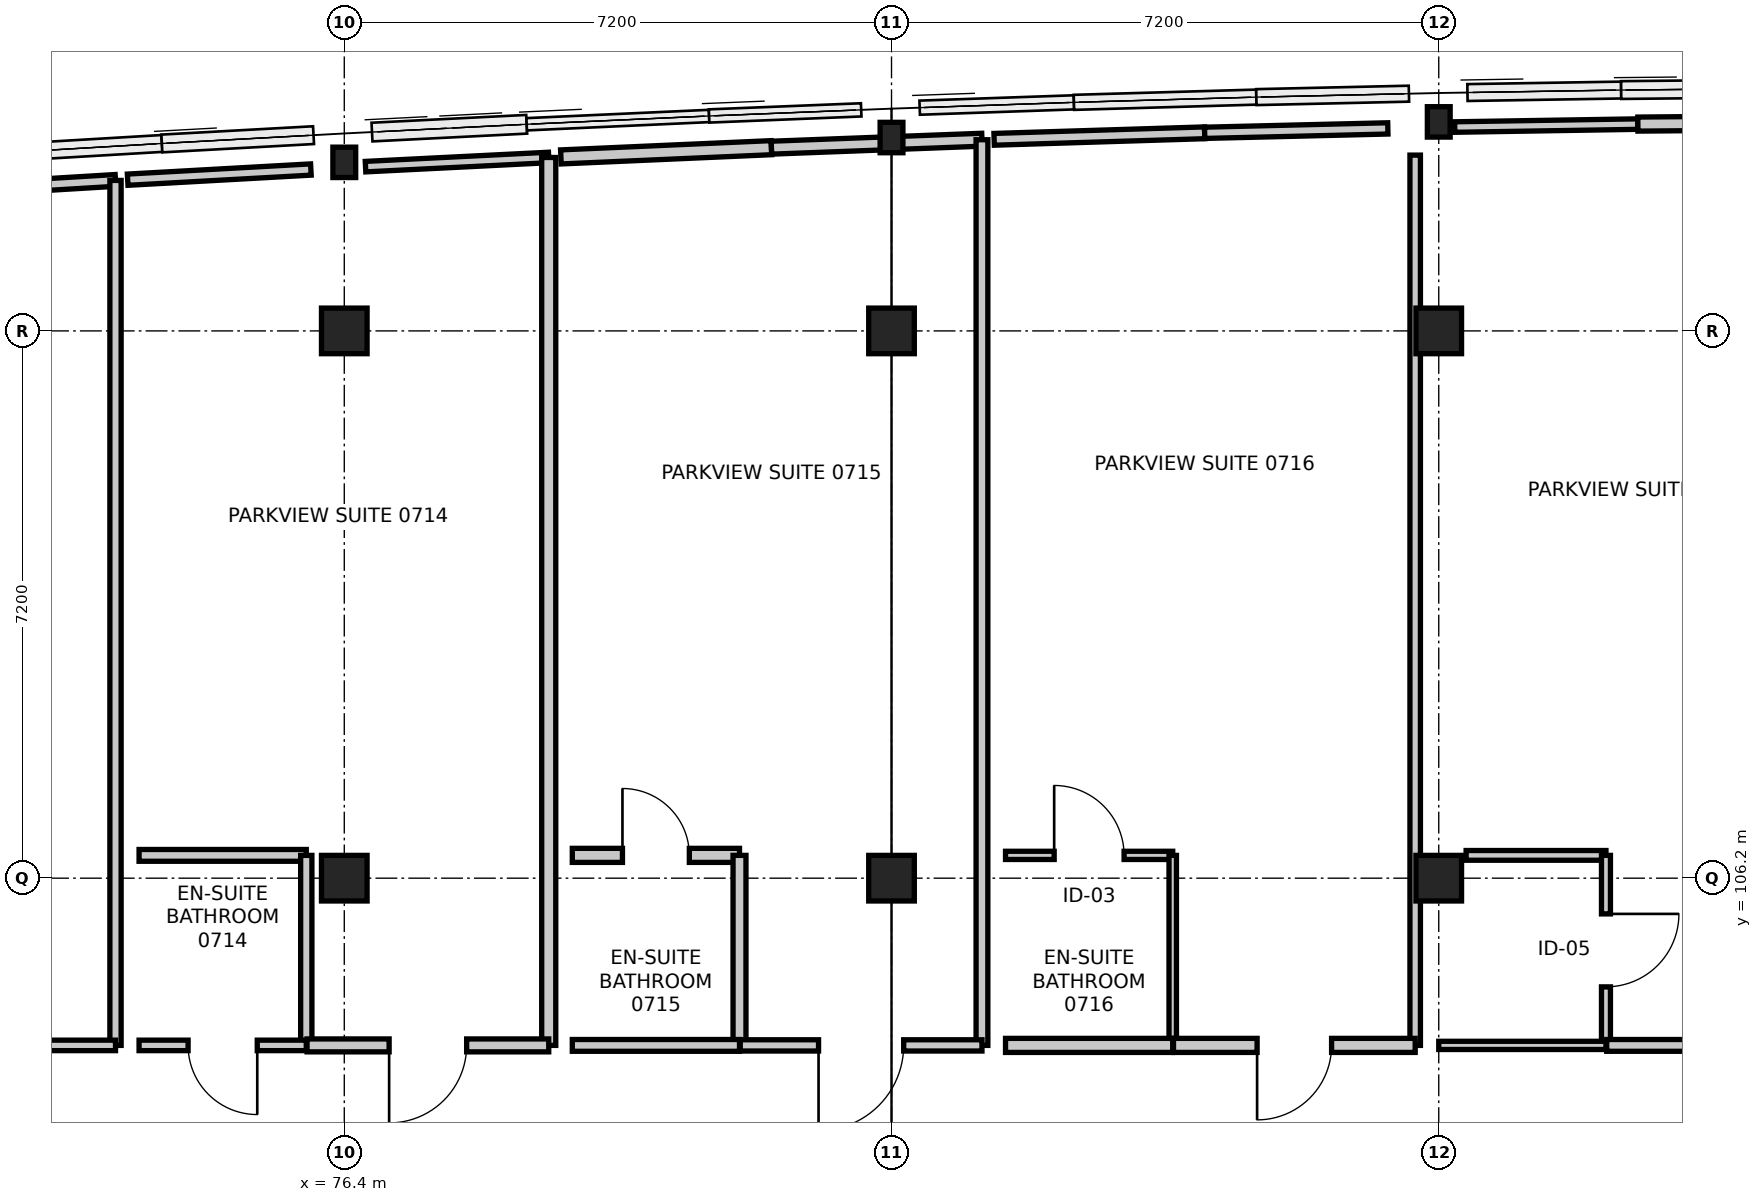
"""IFC4 building model, lengths in metres.
Left out: names, types, materials, properties, quantities, classifications, styles, units other than length and angle.
Written with IfcOpenShell. Run it as: python <this file> out.ifc"""

import sys

from ifc_helpers import new_model, si_unit, direction, frame, frame_2d, origin, origin_2d, place, context, subcontext, project, spatial, rectangle, i_section, extrude, element, fill, save


model = new_model("IFC4")
c1 = context("Model", 3, precision=1e-05, world=origin(), true_north=direction((0.0, 1.0)))
c2 = subcontext(c1, "Body", "Model", "MODEL_VIEW")
j1 = project(units=[si_unit("LENGTHUNIT", "METRE"), si_unit("PLANEANGLEUNIT", "RADIAN")], contexts=[c1])
p1 = place(None, origin())
s1 = spatial("IfcSite", under=j1, at=p1, CompositionType="ELEMENT")
p2 = place(p1, origin())
s2 = spatial("IfcBuilding", under=s1, at=p2, CompositionType="ELEMENT")
p3 = place(p2, frame((0.0, 0.0, 30.0)))
s3 = spatial("IfcBuildingStorey", under=s2, at=p3, CompositionType="ELEMENT", Elevation=30.0)
for number, where, z_axis, x_axis in (
    (1, (76.4, 106.2, 0.0), (0.0, 0.0, 1.0), (1.0, 0.0, 0.0)),
    (2, (76.4, 113.4, 0.0), (0.0, 0.0, 1.0), (1.0, 0.0, 0.0)),
):
    element("IfcColumn", number, at=place(p3, frame(where, z_axis=z_axis, x_axis=x_axis)), inside=s3, PredefinedType="COLUMN", context=c2, shape_type="SweptSolid", body=[
        extrude(rectangle(XDim=0.6, YDim=0.6, at=origin_2d()), origin(), (0.0, 0.0, 1.0), 3.6),
    ])
p4 = place(p3, frame((76.4, 115.618, 0.0), z_axis=(0.0, 0.0, 1.0), x_axis=(1.0, 0.0, 0.0)))
e3 = element("IfcColumn", 3, at=p4, inside=s3, PredefinedType="COLUMN", context=c2, shape_type="SweptSolid", body=[
    extrude(i_section(OverallWidth=0.3, OverallDepth=0.4, WebThickness=0.013, FlangeThickness=0.024, FilletRadius=0.027, at=origin_2d()), origin(), (0.0, 0.0, 1.0), 3.6),
])
for number, where, z_axis, x_axis in (
    (4, (83.6, 106.2, 0.0), (0.0, 0.0, 1.0), (1.0, 0.0, 0.0)),
    (5, (83.6, 113.4, 0.0), (0.0, 0.0, 1.0), (1.0, 0.0, 0.0)),
):
    element("IfcColumn", number, at=place(p3, frame(where, z_axis=z_axis, x_axis=x_axis)), inside=s3, PredefinedType="COLUMN", context=c2, shape_type="SweptSolid", body=[
        extrude(rectangle(XDim=0.6, YDim=0.6, at=origin_2d()), origin(), (0.0, 0.0, 1.0), 3.6),
    ])
p5 = place(p3, frame((83.6, 115.944, 0.0), z_axis=(0.0, 0.0, 1.0), x_axis=(1.0, 0.0, 0.0)))
e6 = element("IfcColumn", 6, at=p5, inside=s3, PredefinedType="COLUMN", context=c2, shape_type="SweptSolid", body=[
    extrude(i_section(OverallWidth=0.3, OverallDepth=0.4, WebThickness=0.013, FlangeThickness=0.024, FilletRadius=0.027, at=origin_2d()), origin(), (0.0, 0.0, 1.0), 3.6),
])
for number, where, z_axis, x_axis in (
    (7, (90.8, 106.2, 0.0), (0.0, 0.0, 1.0), (1.0, 0.0, 0.0)),
    (8, (90.8, 113.4, 0.0), (0.0, 0.0, 1.0), (1.0, 0.0, 0.0)),
):
    element("IfcColumn", number, at=place(p3, frame(where, z_axis=z_axis, x_axis=x_axis)), inside=s3, PredefinedType="COLUMN", context=c2, shape_type="SweptSolid", body=[
        extrude(rectangle(XDim=0.6, YDim=0.6, at=origin_2d()), origin(), (0.0, 0.0, 1.0), 3.6),
    ])
p6 = place(p3, frame((90.8, 116.15, 0.0), z_axis=(0.0, 0.0, 1.0), x_axis=(1.0, 0.0, 0.0)))
e9 = element("IfcColumn", 9, at=p6, inside=s3, PredefinedType="COLUMN", context=c2, shape_type="SweptSolid", body=[
    extrude(i_section(OverallWidth=0.3, OverallDepth=0.4, WebThickness=0.013, FlangeThickness=0.024, FilletRadius=0.027, at=origin_2d()), origin(), (0.0, 0.0, 1.0), 3.6),
])
p7 = place(p3, frame((70.62, 115.213, 0.0), z_axis=(0.0, 0.0, 1.0), x_axis=(0.998192726689, 0.06009392969, 0.0)))
e10 = element("IfcWall", 10, at=p7, inside=s3, PredefinedType="PARTITIONING", context=c2, shape_type="SweptSolid", body=[
    extrude(rectangle(XDim=2.775, YDim=0.155, at=frame_2d((1.387, 0.0))), origin(), (0.0, 0.0, 1.0), 2.936),
])
p8 = place(p3, frame((73.39, 115.38, 0.0), z_axis=(0.0, 0.0, 1.0), x_axis=(0.0, -1.0, 0.0)))
e11 = element("IfcWall", 11, at=p8, inside=s3, PredefinedType="PARTITIONING", context=c2, shape_type="SweptSolid", body=[
    extrude(rectangle(XDim=11.38, YDim=0.148, at=frame_2d((5.69, 0.0))), origin(), (0.0, 0.0, 1.0), 2.745),
])
p9 = place(p3, frame((73.39, 104.0, 0.0), z_axis=(0.0, 0.0, 1.0), x_axis=(-1.0, 0.0, 0.0)))
e12 = element("IfcWall", 12, at=p9, inside=s3, PredefinedType="PARTITIONING", context=c2, shape_type="SweptSolid", body=[
    extrude(rectangle(XDim=3.18, YDim=0.138, at=frame_2d((1.59, 0.0))), origin(), (0.0, 0.0, 1.0), 3.36),
])
p10 = place(p9, frame((1.115, 0.0, 0.0)))
e13 = element("IfcOpeningElement", 13, at=p10, cuts=e12, PredefinedType="OPENING", context=c2, shape_type="SweptSolid", body=[
    extrude(rectangle(XDim=0.95, YDim=2.1, at=frame_2d((0.475, 1.05))), frame((0.0, 0.079, 0.0), z_axis=(0.0, -1.0, 0.0), x_axis=(1.0, 0.0, 0.0)), (0.0, 0.0, 1.0), 0.158),
])
p11 = place(p3, frame((73.7, 106.5, 0.0), z_axis=(0.0, 0.0, 1.0), x_axis=(1.0, 0.0, 0.0)))
e14 = element("IfcWall", 14, at=p11, inside=s3, PredefinedType="PARTITIONING", context=c2, shape_type="SweptSolid", body=[
    extrude(rectangle(XDim=2.2, YDim=0.155, at=frame_2d((1.1, 0.0))), origin(), (0.0, 0.0, 1.0), 3.36),
])
p12 = place(p3, frame((75.9, 106.5, 0.0), z_axis=(0.0, 0.0, 1.0), x_axis=(0.0, -1.0, 0.0)))
e15 = element("IfcWall", 15, at=p12, inside=s3, PredefinedType="PARTITIONING", context=c2, shape_type="SweptSolid", body=[
    extrude(rectangle(XDim=2.5, YDim=0.148, at=frame_2d((1.25, 0.0))), origin(), (0.0, 0.0, 1.0), 2.745),
])
p13 = place(p3, frame((75.9, 104.0, 0.0), z_axis=(0.0, 0.0, 1.0), x_axis=(-1.0, 0.0, 0.0)))
e16 = element("IfcWall", 16, at=p13, inside=s3, PredefinedType="PARTITIONING", context=c2, shape_type="SweptSolid", body=[
    extrude(rectangle(XDim=2.2, YDim=0.138, at=frame_2d((1.1, 0.0))), origin(), (0.0, 0.0, 1.0), 3.36),
])
p14 = place(p13, frame((0.645, 0.0, 0.0)))
e17 = element("IfcOpeningElement", 17, at=p14, cuts=e16, PredefinedType="OPENING", context=c2, shape_type="SweptSolid", body=[
    extrude(rectangle(XDim=0.91, YDim=2.11, at=frame_2d((0.455, 1.055))), frame((0.0, 0.079, 0.0), z_axis=(0.0, -1.0, 0.0), x_axis=(1.0, 0.0, 0.0)), (0.0, 0.0, 1.0), 0.158),
])
p15 = place(p3, frame((73.55, 115.389, 0.0), z_axis=(0.0, 0.0, 1.0), x_axis=(0.998463152475, 0.0554196098, 0.0)))
e18 = element("IfcWall", 18, at=p15, inside=s3, PredefinedType="PARTITIONING", context=c2, shape_type="SweptSolid", body=[
    extrude(rectangle(XDim=2.414, YDim=0.148, at=frame_2d((1.207, 0.0))), origin(), (0.0, 0.0, 1.0), 2.936),
])
p16 = place(p3, frame((76.679, 115.561, 0.0), z_axis=(0.0, 0.0, 1.0), x_axis=(0.998755867805, 0.049866988336, 0.0)))
e19 = element("IfcWall", 19, at=p16, inside=s3, PredefinedType="PARTITIONING", context=c2, shape_type="SweptSolid", body=[
    extrude(rectangle(XDim=2.414, YDim=0.138, at=frame_2d((1.207, 0.0))), origin(), (0.0, 0.0, 1.0), 2.936),
])
p17 = place(p3, frame((79.09, 115.682, 0.0), z_axis=(0.0, 0.0, 1.0), x_axis=(0.0, -1.0, 0.0)))
e20 = element("IfcWall", 20, at=p17, inside=s3, PredefinedType="PARTITIONING", context=c2, shape_type="SweptSolid", body=[
    extrude(rectangle(XDim=11.682, YDim=0.185, at=frame_2d((5.841, 0.0))), origin(), (0.0, 0.0, 1.0), 2.745),
])
p18 = place(p3, frame((79.09, 104.0, 0.0), z_axis=(0.0, 0.0, 1.0), x_axis=(-1.0, 0.0, 0.0)))
e21 = element("IfcWall", 21, at=p18, inside=s3, PredefinedType="PARTITIONING", context=c2, shape_type="SweptSolid", body=[
    extrude(rectangle(XDim=3.18, YDim=0.17, at=frame_2d((1.59, 0.0))), origin(), (0.0, 0.0, 1.0), 2.695),
])
p19 = place(p18, frame((1.08, 0.0, 0.0)))
e22 = element("IfcOpeningElement", 22, at=p19, cuts=e21, PredefinedType="OPENING", context=c2, shape_type="SweptSolid", body=[
    extrude(rectangle(XDim=1.02, YDim=2.15, at=frame_2d((0.51, 1.075))), frame((0.0, 0.095, 0.0), z_axis=(0.0, -1.0, 0.0), x_axis=(1.0, 0.0, 0.0)), (0.0, 0.0, 1.0), 0.19),
])
p20 = place(p3, frame((79.4, 106.5, 0.0), z_axis=(0.0, 0.0, 1.0), x_axis=(1.0, 0.0, 0.0)))
e23 = element("IfcWall", 23, at=p20, inside=s3, PredefinedType="PARTITIONING", context=c2, shape_type="SweptSolid", body=[
    extrude(rectangle(XDim=2.2, YDim=0.185, at=frame_2d((1.1, 0.0))), origin(), (0.0, 0.0, 1.0), 2.745),
])
p21 = place(p20, frame((0.66, 0.0, 0.0)))
e24 = element("IfcOpeningElement", 24, at=p21, cuts=e23, PredefinedType="OPENING", context=c2, shape_type="SweptSolid", body=[
    extrude(rectangle(XDim=0.88, YDim=2.06, at=frame_2d((0.44, 1.03))), frame((0.0, 0.103, 0.0), z_axis=(0.0, -1.0, 0.0), x_axis=(1.0, 0.0, 0.0)), (0.0, 0.0, 1.0), 0.205),
])
p22 = place(p3, frame((81.6, 106.5, 0.0), z_axis=(0.0, 0.0, 1.0), x_axis=(0.0, -1.0, 0.0)))
e25 = element("IfcWall", 25, at=p22, inside=s3, PredefinedType="PARTITIONING", context=c2, shape_type="SweptSolid", body=[
    extrude(rectangle(XDim=2.5, YDim=0.17, at=frame_2d((1.25, 0.0))), origin(), (0.0, 0.0, 1.0), 2.745),
])
p23 = place(p3, frame((81.6, 104.0, 0.0), z_axis=(0.0, 0.0, 1.0), x_axis=(-1.0, 0.0, 0.0)))
e26 = element("IfcWall", 26, at=p23, inside=s3, PredefinedType="PARTITIONING", context=c2, shape_type="SweptSolid", body=[
    extrude(rectangle(XDim=2.2, YDim=0.155, at=frame_2d((1.1, 0.0))), origin(), (0.0, 0.0, 1.0), 3.36),
])
p24 = place(p3, frame((79.25, 115.689, 0.0), z_axis=(0.0, 0.0, 1.0), x_axis=(0.999038130447, 0.043849902077, 0.0)))
e27 = element("IfcWall", 27, at=p24, inside=s3, PredefinedType="PARTITIONING", context=c2, shape_type="SweptSolid", body=[
    extrude(rectangle(XDim=2.773, YDim=0.185, at=frame_2d((1.386, 0.0))), origin(), (0.0, 0.0, 1.0), 2.936),
])
p25 = place(p3, frame((82.02, 115.811, 0.0), z_axis=(0.0, 0.0, 1.0), x_axis=(0.999289263223, 0.03769573459, 0.0)))
e28 = element("IfcWall", 28, at=p25, inside=s3, PredefinedType="PARTITIONING", context=c2, shape_type="SweptSolid", body=[
    extrude(rectangle(XDim=2.772, YDim=0.17, at=frame_2d((1.386, 0.0))), origin(), (0.0, 0.0, 1.0), 2.936),
])
p26 = place(p3, frame((84.79, 115.915, 0.0), z_axis=(0.0, 0.0, 1.0), x_axis=(0.0, -1.0, 0.0)))
e29 = element("IfcWall", 29, at=p26, inside=s3, PredefinedType="PARTITIONING", context=c2, shape_type="SweptSolid", body=[
    extrude(rectangle(XDim=11.915, YDim=0.155, at=frame_2d((5.958, 0.0))), origin(), (0.0, 0.0, 1.0), 2.745),
])
p27 = place(p3, frame((84.79, 104.0, 0.0), z_axis=(0.0, 0.0, 1.0), x_axis=(-1.0, 0.0, 0.0)))
e30 = element("IfcWall", 30, at=p27, inside=s3, PredefinedType="PARTITIONING", context=c2, shape_type="SweptSolid", body=[
    extrude(rectangle(XDim=3.18, YDim=0.148, at=frame_2d((1.59, 0.0))), origin(), (0.0, 0.0, 1.0), 2.695),
])
p28 = place(p27, frame((1.03, 0.0, 0.0)))
e31 = element("IfcOpeningElement", 31, at=p28, cuts=e30, PredefinedType="OPENING", context=c2, shape_type="SweptSolid", body=[
    extrude(rectangle(XDim=1.12, YDim=2.2, at=frame_2d((0.56, 1.1))), frame((0.0, 0.084, 0.0), z_axis=(0.0, -1.0, 0.0), x_axis=(1.0, 0.0, 0.0)), (0.0, 0.0, 1.0), 0.168),
])
p29 = place(p3, frame((85.1, 106.5, 0.0), z_axis=(0.0, 0.0, 1.0), x_axis=(1.0, 0.0, 0.0)))
e32 = element("IfcWall", 32, at=p29, inside=s3, PredefinedType="PARTITIONING", context=c2, shape_type="SweptSolid", body=[
    extrude(rectangle(XDim=2.2, YDim=0.108, at=frame_2d((1.1, 0.0))), origin(), (0.0, 0.0, 1.0), 3.36),
])
p30 = place(p29, frame((0.64, 0.0, 0.0)))
e33 = element("IfcOpeningElement", 33, at=p30, cuts=e32, PredefinedType="OPENING", context=c2, shape_type="SweptSolid", body=[
    extrude(rectangle(XDim=0.92, YDim=2.1, at=frame_2d((0.46, 1.05))), frame((0.0, 0.064, 0.0), z_axis=(0.0, -1.0, 0.0), x_axis=(1.0, 0.0, 0.0)), (0.0, 0.0, 1.0), 0.128),
])
p31 = place(p3, frame((87.3, 106.5, 0.0), z_axis=(0.0, 0.0, 1.0), x_axis=(0.0, -1.0, 0.0)))
e34 = element("IfcWall", 34, at=p31, inside=s3, PredefinedType="PARTITIONING", context=c2, shape_type="SweptSolid", body=[
    extrude(rectangle(XDim=2.5, YDim=0.098, at=frame_2d((1.25, 0.0))), origin(), (0.0, 0.0, 1.0), 2.745),
])
p32 = place(p3, frame((87.3, 104.0, 0.0), z_axis=(0.0, 0.0, 1.0), x_axis=(-1.0, 0.0, 0.0)))
e35 = element("IfcWall", 35, at=p32, inside=s3, PredefinedType="PARTITIONING", context=c2, shape_type="SweptSolid", body=[
    extrude(rectangle(XDim=2.2, YDim=0.185, at=frame_2d((1.1, 0.0))), origin(), (0.0, 0.0, 1.0), 3.36),
])
p33 = place(p3, frame((84.95, 115.921, 0.0), z_axis=(0.0, 0.0, 1.0), x_axis=(0.999524543579, 0.030833209083, 0.0)))
e36 = element("IfcWall", 36, at=p33, inside=s3, PredefinedType="PARTITIONING", context=c2, shape_type="SweptSolid", body=[
    extrude(rectangle(XDim=2.771, YDim=0.155, at=frame_2d((1.386, 0.0))), origin(), (0.0, 0.0, 1.0), 2.936),
])
p34 = place(p3, frame((87.72, 116.006, 0.0), z_axis=(0.0, 0.0, 1.0), x_axis=(0.999709514567, 0.024101586757, 0.0)))
e37 = element("IfcWall", 37, at=p34, inside=s3, PredefinedType="PARTITIONING", context=c2, shape_type="SweptSolid", body=[
    extrude(rectangle(XDim=2.411, YDim=0.148, at=frame_2d((1.206, 0.0))), origin(), (0.0, 0.0, 1.0), 2.936),
])
p35 = place(p3, frame((90.49, 115.713, 0.0), z_axis=(0.0, 0.0, 1.0), x_axis=(0.0, -1.0, 0.0)))
e38 = element("IfcWall", 38, at=p35, inside=s3, PredefinedType="PARTITIONING", context=c2, shape_type="SweptSolid", body=[
    extrude(rectangle(XDim=11.713, YDim=0.138, at=frame_2d((5.856, 0.0))), origin(), (0.0, 0.0, 1.0), 2.695),
])
p36 = place(p3, frame((90.49, 104.0, 0.0), z_axis=(0.0, 0.0, 1.0), x_axis=(-1.0, 0.0, 0.0)))
e39 = element("IfcWall", 39, at=p36, inside=s3, PredefinedType="PARTITIONING", context=c2, shape_type="SweptSolid", body=[
    extrude(rectangle(XDim=3.18, YDim=0.185, at=frame_2d((1.59, 0.0))), origin(), (0.0, 0.0, 1.0), 3.36),
])
p37 = place(p36, frame((1.1, 0.0, 0.0)))
e40 = element("IfcOpeningElement", 40, at=p37, cuts=e39, PredefinedType="OPENING", context=c2, shape_type="SweptSolid", body=[
    extrude(rectangle(XDim=0.98, YDim=2.15, at=frame_2d((0.49, 1.075))), frame((0.0, 0.103, 0.0), z_axis=(0.0, -1.0, 0.0), x_axis=(1.0, 0.0, 0.0)), (0.0, 0.0, 1.0), 0.205),
])
p38 = place(p3, frame((91.16, 106.5, 0.0), z_axis=(0.0, 0.0, 1.0), x_axis=(1.0, 0.0, 0.0)))
e41 = element("IfcWall", 41, at=p38, inside=s3, PredefinedType="PARTITIONING", context=c2, shape_type="SweptSolid", body=[
    extrude(rectangle(XDim=1.84, YDim=0.128, at=frame_2d((0.92, 0.0))), origin(), (0.0, 0.0, 1.0), 3.36),
])
p39 = place(p3, frame((93.0, 106.5, 0.0), z_axis=(0.0, 0.0, 1.0), x_axis=(0.0, -1.0, 0.0)))
e42 = element("IfcWall", 42, at=p39, inside=s3, PredefinedType="PARTITIONING", context=c2, shape_type="SweptSolid", body=[
    extrude(rectangle(XDim=2.5, YDim=0.118, at=frame_2d((1.25, 0.0))), origin(), (0.0, 0.0, 1.0), 2.745),
])
p40 = place(p39, frame((0.77, 0.0, 0.0)))
e43 = element("IfcOpeningElement", 43, at=p40, cuts=e42, PredefinedType="OPENING", context=c2, shape_type="SweptSolid", body=[
    extrude(rectangle(XDim=0.96, YDim=2.14, at=frame_2d((0.48, 1.07))), frame((0.0, 0.069, 0.0), z_axis=(0.0, -1.0, 0.0), x_axis=(1.0, 0.0, 0.0)), (0.0, 0.0, 1.0), 0.138),
])
p41 = place(p3, frame((93.0, 104.0, 0.0), z_axis=(0.0, 0.0, 1.0), x_axis=(-1.0, 0.0, 0.0)))
e44 = element("IfcWall", 44, at=p41, inside=s3, PredefinedType="PARTITIONING", context=c2, shape_type="SweptSolid", body=[
    extrude(rectangle(XDim=2.2, YDim=0.108, at=frame_2d((1.1, 0.0))), origin(), (0.0, 0.0, 1.0), 2.695),
])
p42 = place(p3, frame((91.01, 116.082, 0.0), z_axis=(0.0, 0.0, 1.0), x_axis=(0.999870294782, 0.016105701233, 0.0)))
e45 = element("IfcWall", 45, at=p42, inside=s3, PredefinedType="PARTITIONING", context=c2, shape_type="SweptSolid", body=[
    extrude(rectangle(XDim=2.41, YDim=0.138, at=frame_2d((1.205, 0.0))), origin(), (0.0, 0.0, 1.0), 2.936),
])
p43 = place(p3, frame((93.42, 116.121, 0.0), z_axis=(0.0, 0.0, 1.0), x_axis=(0.999964948321, 0.008372701401, 0.0)))
e46 = element("IfcWall", 46, at=p43, inside=s3, PredefinedType="PARTITIONING", context=c2, shape_type="SweptSolid", body=[
    extrude(rectangle(XDim=2.77, YDim=0.185, at=frame_2d((1.385, 0.0))), origin(), (0.0, 0.0, 1.0), 2.936),
])
p44 = place(p3, frame((96.19, 104.0, 0.0), z_axis=(0.0, 0.0, 1.0), x_axis=(-1.0, 0.0, 0.0)))
e47 = element("IfcWall", 47, at=p44, inside=s3, PredefinedType="PARTITIONING", context=c2, shape_type="SweptSolid", body=[
    extrude(rectangle(XDim=3.18, YDim=0.155, at=frame_2d((1.59, 0.0))), origin(), (0.0, 0.0, 1.0), 3.36),
])
p45 = place(p44, frame((1.06, 0.0, 0.0)))
e48 = element("IfcOpeningElement", 48, at=p45, cuts=e47, PredefinedType="OPENING", context=c2, shape_type="SweptSolid", body=[
    extrude(rectangle(XDim=1.06, YDim=2.2, at=frame_2d((0.53, 1.1))), frame((0.0, 0.087, 0.0), z_axis=(0.0, -1.0, 0.0), x_axis=(1.0, 0.0, 0.0)), (0.0, 0.0, 1.0), 0.175),
])
p46 = place(p14, origin())
e49 = element("IfcDoor", 49, at=p46, inside=s3, OperationType="SINGLE_SWING_LEFT", PredefinedType="DOOR", context=c2, shape_type="SweptSolid", body=[
    extrude(rectangle(XDim=0.91, YDim=2.11, at=frame_2d((0.455, 1.055))), frame((0.0, 0.025, 0.0), z_axis=(0.0, -1.0, 0.0), x_axis=(1.0, 0.0, 0.0)), (0.0, 0.0, 1.0), 0.05),
])
fill(e17, e49)
p47 = place(p19, origin())
e50 = element("IfcDoor", 50, at=p47, inside=s3, OperationType="SINGLE_SWING_RIGHT", PredefinedType="DOOR", context=c2, shape_type="SweptSolid", body=[
    extrude(rectangle(XDim=1.02, YDim=2.15, at=frame_2d((0.51, 1.075))), frame((0.0, 0.025, 0.0), z_axis=(0.0, -1.0, 0.0), x_axis=(1.0, 0.0, 0.0)), (0.0, 0.0, 1.0), 0.05),
])
fill(e22, e50)
p48 = place(p21, origin())
e51 = element("IfcDoor", 51, at=p48, inside=s3, OperationType="SINGLE_SWING_LEFT", PredefinedType="DOOR", context=c2, shape_type="SweptSolid", body=[
    extrude(rectangle(XDim=0.88, YDim=2.06, at=frame_2d((0.44, 1.03))), frame((0.0, 0.025, 0.0), z_axis=(0.0, -1.0, 0.0), x_axis=(1.0, 0.0, 0.0)), (0.0, 0.0, 1.0), 0.05),
])
fill(e24, e51)
p49 = place(p28, origin())
e52 = element("IfcDoor", 52, at=p49, inside=s3, OperationType="SINGLE_SWING_RIGHT", PredefinedType="DOOR", context=c2, shape_type="SweptSolid", body=[
    extrude(rectangle(XDim=1.12, YDim=2.2, at=frame_2d((0.56, 1.1))), frame((0.0, 0.025, 0.0), z_axis=(0.0, -1.0, 0.0), x_axis=(1.0, 0.0, 0.0)), (0.0, 0.0, 1.0), 0.05),
])
fill(e31, e52)
p50 = place(p30, origin())
e53 = element("IfcDoor", 53, at=p50, inside=s3, OperationType="SINGLE_SWING_LEFT", PredefinedType="DOOR", context=c2, shape_type="SweptSolid", body=[
    extrude(rectangle(XDim=0.92, YDim=2.1, at=frame_2d((0.46, 1.05))), frame((0.0, 0.025, 0.0), z_axis=(0.0, -1.0, 0.0), x_axis=(1.0, 0.0, 0.0)), (0.0, 0.0, 1.0), 0.05),
])
fill(e33, e53)
p51 = place(p37, origin())
e54 = element("IfcDoor", 54, at=p51, inside=s3, OperationType="SINGLE_SWING_RIGHT", PredefinedType="DOOR", context=c2, shape_type="SweptSolid", body=[
    extrude(rectangle(XDim=0.98, YDim=2.15, at=frame_2d((0.49, 1.075))), frame((0.0, 0.025, 0.0), z_axis=(0.0, -1.0, 0.0), x_axis=(1.0, 0.0, 0.0)), (0.0, 0.0, 1.0), 0.05),
])
fill(e40, e54)
p52 = place(p40, origin())
e55 = element("IfcDoor", 55, at=p52, inside=s3, OperationType="SINGLE_SWING_LEFT", PredefinedType="DOOR", context=c2, shape_type="SweptSolid", body=[
    extrude(rectangle(XDim=0.96, YDim=2.14, at=frame_2d((0.48, 1.07))), frame((0.0, 0.025, 0.0), z_axis=(0.0, -1.0, 0.0), x_axis=(1.0, 0.0, 0.0)), (0.0, 0.0, 1.0), 0.05),
])
fill(e43, e55)
save(model, sys.argv[1])
